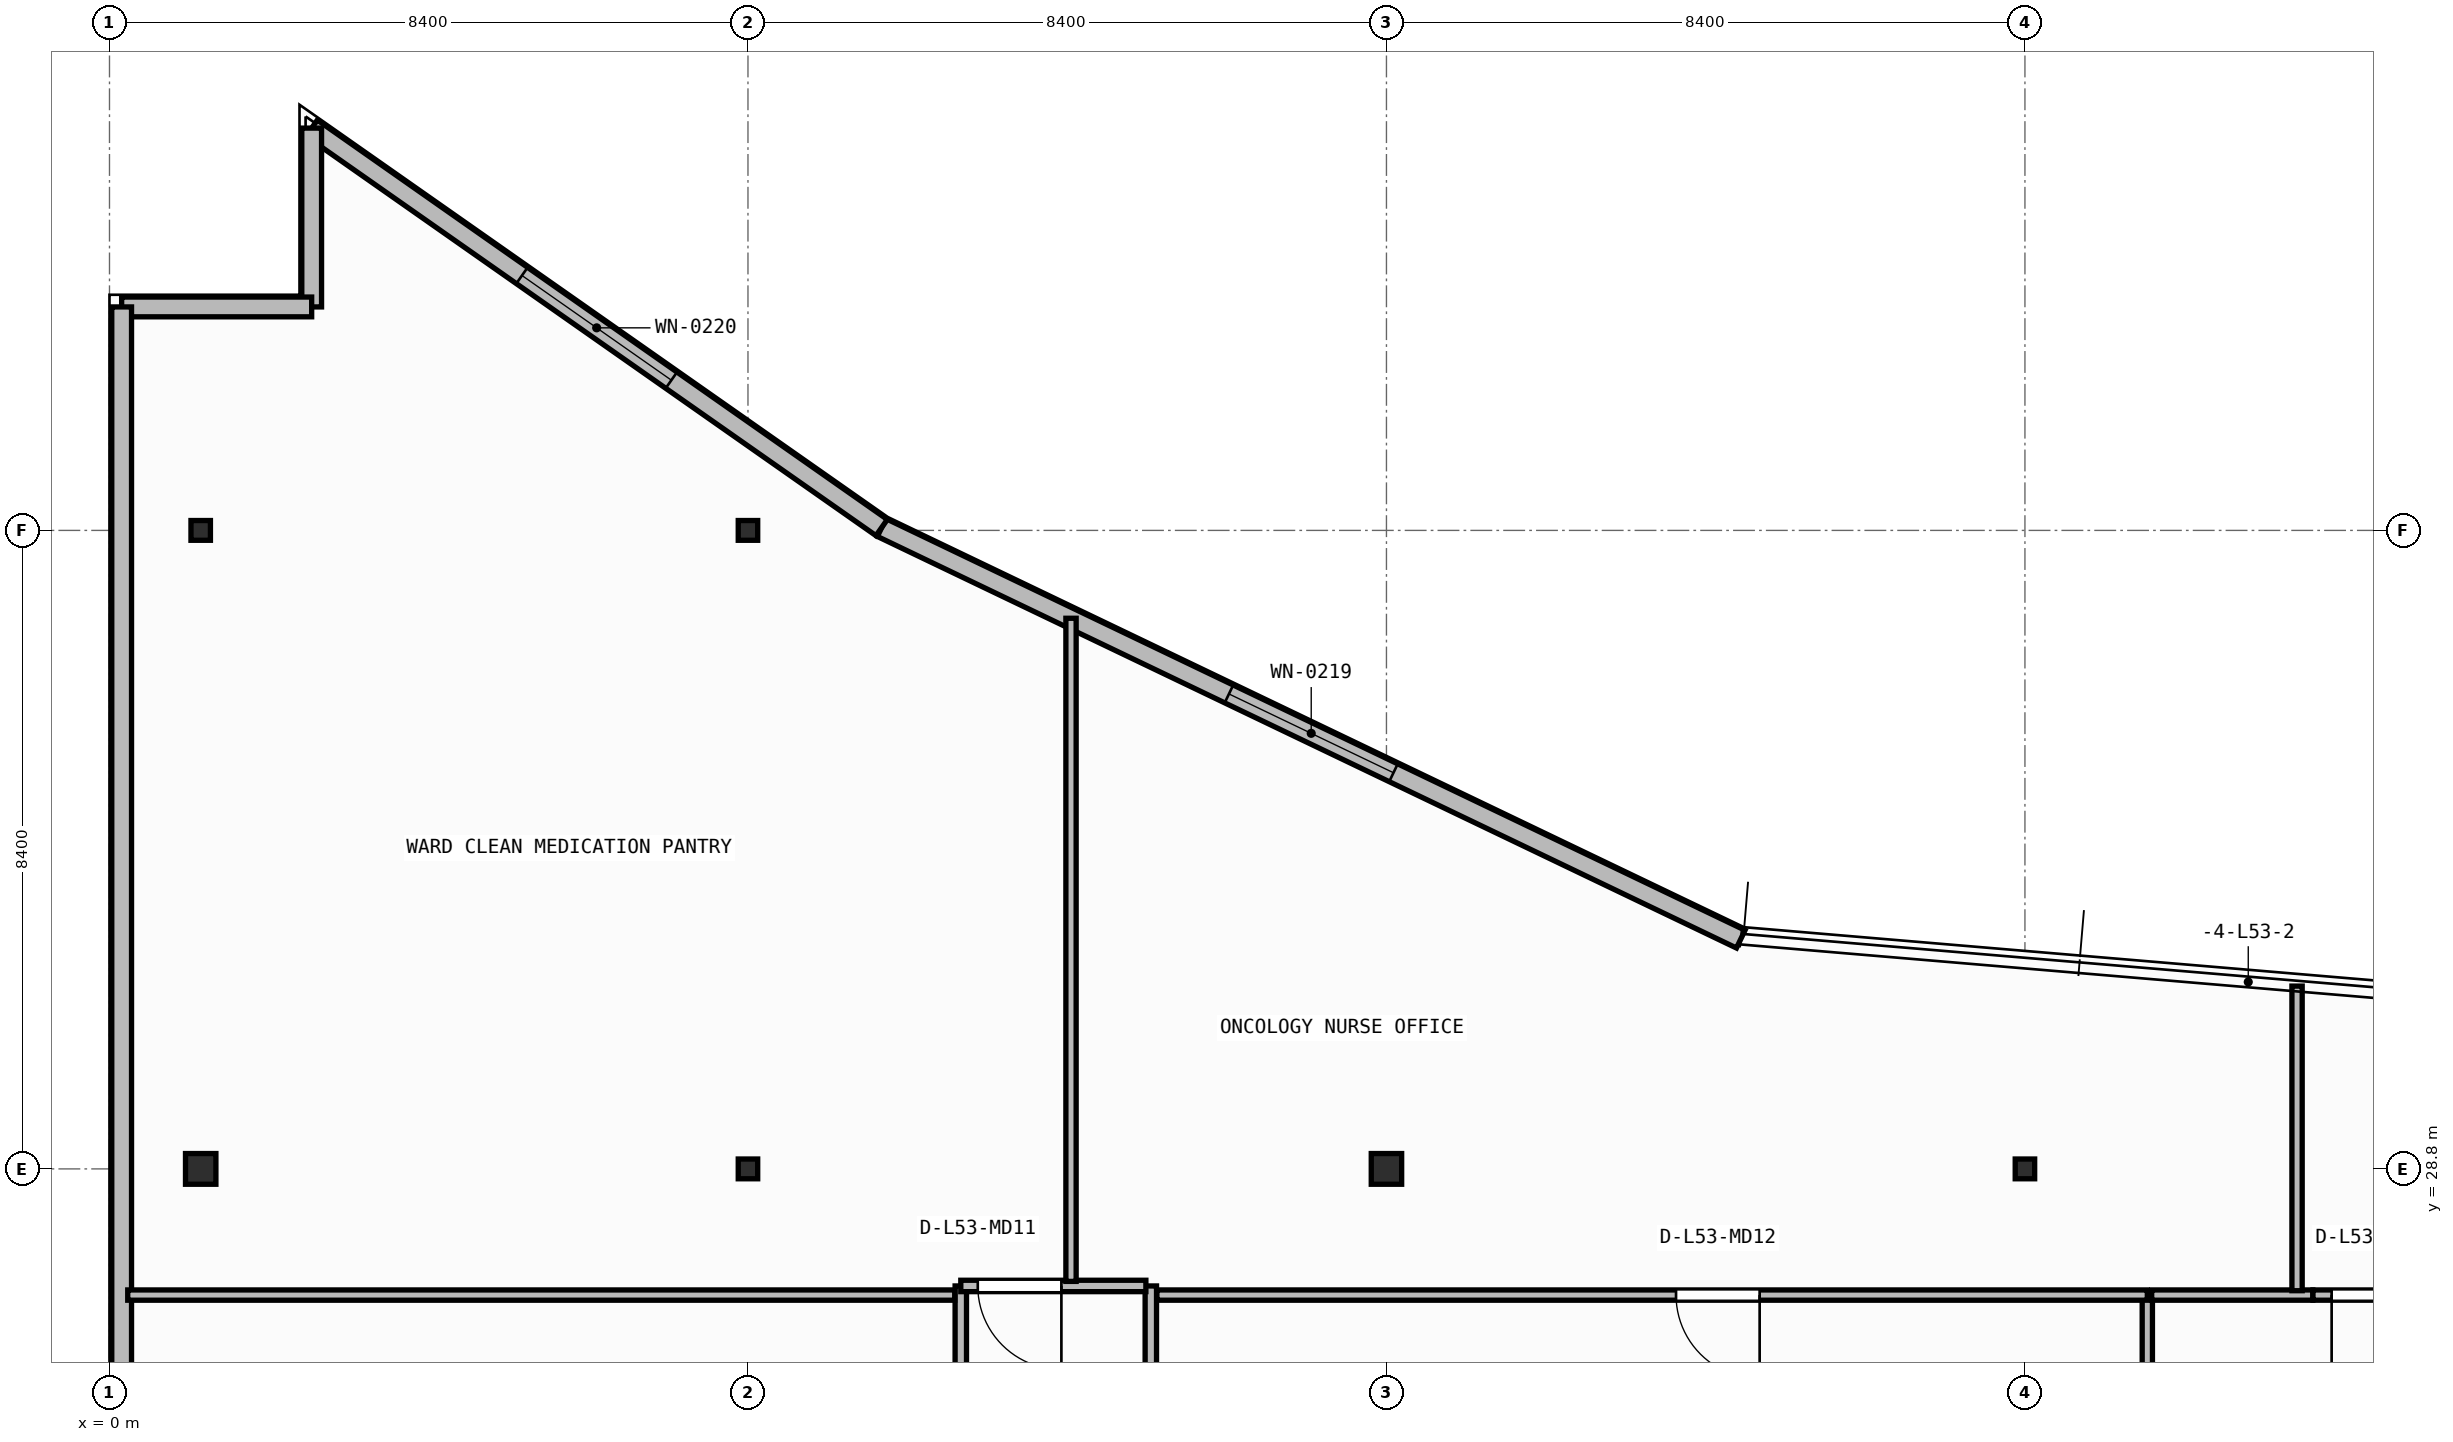
"""IFC4 building model, lengths in metres.
Left out: names, types, materials, properties, quantities, classifications, styles, units other than length and angle.
Written with IfcOpenShell. Run it as: python <this file> out.ifc"""

import sys

from ifc_helpers import new_model, si_unit, direction, frame, frame_2d, origin, origin_2d, place, context, subcontext, project, spatial, rectangle, i_section, extrude, element, fill, save


model = new_model("IFC4")
c1 = context("Model", 3, precision=1e-05, world=origin(), true_north=direction((0.0, 1.0)))
c2 = subcontext(c1, "Body", "Model", "MODEL_VIEW")
j1 = project(units=[si_unit("LENGTHUNIT", "METRE"), si_unit("PLANEANGLEUNIT", "RADIAN")], contexts=[c1])
p1 = place(None, origin())
s1 = spatial("IfcSite", under=j1, at=p1, CompositionType="ELEMENT")
p2 = place(p1, origin())
s2 = spatial("IfcBuilding", under=s1, at=p2, CompositionType="ELEMENT")
p3 = place(p2, frame((0.0, 0.0, 215.8)))
s3 = spatial("IfcBuildingStorey", under=s2, at=p3, CompositionType="ELEMENT", Elevation=215.8)
p4 = place(p3, frame((1.2, 28.8, 0.0), z_axis=(0.0, 0.0, 1.0), x_axis=(1.0, 0.0, 0.0)))
e1 = element("IfcColumn", 1, at=p4, inside=s3, PredefinedType="COLUMN", context=c2, shape_type="SweptSolid", body=[
    extrude(i_section(OverallWidth=0.4, OverallDepth=0.404, WebThickness=0.02, FlangeThickness=0.032, at=origin_2d()), origin(), (0.0, 0.0, 1.0), 3.95),
])
p5 = place(p3, frame((8.4, 28.8, 0.0), z_axis=(0.0, 0.0, 1.0), x_axis=(1.0, 0.0, 0.0)))
e2 = element("IfcColumn", 2, at=p5, inside=s3, PredefinedType="COLUMN", context=c2, shape_type="SweptSolid", body=[
    extrude(i_section(OverallWidth=0.256, OverallDepth=0.26, WebThickness=0.01, FlangeThickness=0.017, FilletRadius=0.013, at=origin_2d()), origin(), (0.0, 0.0, 1.0), 3.95),
])
p6 = place(p3, frame((16.8, 28.8, 0.0), z_axis=(0.0, 0.0, 1.0), x_axis=(1.0, 0.0, 0.0)))
e3 = element("IfcColumn", 3, at=p6, inside=s3, PredefinedType="COLUMN", context=c2, shape_type="SweptSolid", body=[
    extrude(i_section(OverallWidth=0.4, OverallDepth=0.404, WebThickness=0.02, FlangeThickness=0.032, at=origin_2d()), origin(), (0.0, 0.0, 1.0), 3.95),
])
for number, where, z_axis, x_axis in (
    (4, (25.2, 28.8, 0.0), (0.0, 0.0, 1.0), (1.0, 0.0, 0.0)),
    (5, (1.2, 37.2, 0.0), (0.0, 0.0, 1.0), (1.0, 0.0, 0.0)),
    (6, (8.4, 37.2, 0.0), (0.0, 0.0, 1.0), (1.0, 0.0, 0.0)),
):
    element("IfcColumn", number, at=place(p3, frame(where, z_axis=z_axis, x_axis=x_axis)), inside=s3, PredefinedType="COLUMN", context=c2, shape_type="SweptSolid", body=[
        extrude(i_section(OverallWidth=0.256, OverallDepth=0.26, WebThickness=0.01, FlangeThickness=0.017, FilletRadius=0.013, at=origin_2d()), origin(), (0.0, 0.0, 1.0), 3.95),
    ])
p7 = place(p3, frame((21.461, 31.823, 0.0), z_axis=(0.0, 0.0, 1.0), x_axis=(-0.901858094827, 0.432032379336, 0.0)))
e7 = element("IfcWall", 7, at=p7, inside=s3, PredefinedType="STANDARD", context=c2, shape_type="SweptSolid", body=[
    extrude(rectangle(XDim=12.532, YDim=0.26, at=frame_2d((6.266, 0.0))), origin(), (0.0, 0.0, 1.0), 3.71),
])
p8 = place(p7, frame((5.066, 0.0, 0.9)))
e8 = element("IfcOpeningElement", 8, at=p8, cuts=e7, PredefinedType="OPENING", context=c2, shape_type="SweptSolid", body=[
    extrude(rectangle(XDim=2.4, YDim=1.65, at=frame_2d((1.2, 0.825))), frame((0.0, 0.14, 0.0), z_axis=(0.0, -1.0, 0.0), x_axis=(1.0, 0.0, 0.0)), (0.0, 0.0, 1.0), 0.28),
])
p9 = place(p3, frame((10.159, 37.237, 0.0), z_axis=(0.0, 0.0, 1.0), x_axis=(-0.818933702389, 0.57388813465, 0.0)))
e9 = element("IfcWall", 9, at=p9, inside=s3, PredefinedType="STANDARD", context=c2, shape_type="SweptSolid", body=[
    extrude(rectangle(XDim=9.157, YDim=0.26, at=frame_2d((4.579, 0.0))), origin(), (0.0, 0.0, 1.0), 3.71),
])
p10 = place(p9, frame((3.378, 0.0, 0.9)))
e10 = element("IfcOpeningElement", 10, at=p10, cuts=e9, PredefinedType="OPENING", context=c2, shape_type="SweptSolid", body=[
    extrude(rectangle(XDim=2.4, YDim=1.65, at=frame_2d((1.2, 0.825))), frame((0.0, 0.14, 0.0), z_axis=(0.0, -1.0, 0.0), x_axis=(1.0, 0.0, 0.0)), (0.0, 0.0, 1.0), 0.28),
])
p11 = place(p3, frame((2.66, 42.492, 0.0), z_axis=(0.0, 0.0, 1.0), x_axis=(0.0, -1.0, 0.0)))
e11 = element("IfcWall", 11, at=p11, inside=s3, PredefinedType="STANDARD", context=c2, shape_type="SweptSolid", body=[
    extrude(rectangle(XDim=2.353, YDim=0.26, at=frame_2d((1.176, 0.0))), origin(), (0.0, 0.0, 1.0), 3.71),
])
p12 = place(p3, frame((2.66, 40.14, 0.0), z_axis=(0.0, 0.0, 1.0), x_axis=(-1.0, 0.0, 0.0)))
e12 = element("IfcWall", 12, at=p12, inside=s3, PredefinedType="STANDARD", context=c2, shape_type="SweptSolid", body=[
    extrude(rectangle(XDim=2.5, YDim=0.26, at=frame_2d((1.25, 0.0))), origin(), (0.0, 0.0, 1.0), 3.71),
])
p13 = place(p3, frame((0.16, 40.14, 0.0), z_axis=(0.0, 0.0, 1.0), x_axis=(0.0, -1.0, 0.0)))
e13 = element("IfcWall", 13, at=p13, inside=s3, PredefinedType="STANDARD", context=c2, shape_type="SweptSolid", body=[
    extrude(rectangle(XDim=37.48, YDim=0.26, at=frame_2d((18.74, 0.0))), origin(), (0.0, 0.0, 1.0), 3.71),
])
p14 = place(p13, frame((27.4, 0.0, 0.9)))
e14 = element("IfcOpeningElement", 14, at=p14, cuts=e13, PredefinedType="OPENING", context=c2, shape_type="SweptSolid", body=[
    extrude(rectangle(XDim=2.4, YDim=1.65, at=frame_2d((1.2, 0.825))), frame((0.0, 0.14, 0.0), z_axis=(0.0, -1.0, 0.0), x_axis=(1.0, 0.0, 0.0)), (0.0, 0.0, 1.0), 0.28),
])
p15 = place(p3, frame((11.2, 27.26, 0.0), z_axis=(0.0, 0.0, 1.0), x_axis=(0.0, -1.0, 0.0)))
e15 = element("IfcWall", 15, at=p15, inside=s3, PredefinedType="PARTITIONING", context=c2, shape_type="SweptSolid", body=[
    extrude(rectangle(XDim=6.592, YDim=0.15, at=frame_2d((3.296, 0.0))), origin(), (0.0, 0.0, 1.0), 3.71),
])
p16 = place(p15, frame((2.746, 0.0, 0.0)))
e16 = element("IfcOpeningElement", 16, at=p16, cuts=e15, PredefinedType="OPENING", context=c2, shape_type="SweptSolid", body=[
    extrude(rectangle(XDim=1.1, YDim=2.1, at=frame_2d((0.55, 1.05))), frame((0.0, 0.085, 0.0), z_axis=(0.0, -1.0, 0.0), x_axis=(1.0, 0.0, 0.0)), (0.0, 0.0, 1.0), 0.17),
])
p17 = place(p3, frame((13.7, 20.668, 0.0), z_axis=(0.0, 0.0, 1.0), x_axis=(0.0, 1.0, 0.0)))
e17 = element("IfcWall", 17, at=p17, inside=s3, PredefinedType="PARTITIONING", context=c2, shape_type="SweptSolid", body=[
    extrude(rectangle(XDim=6.592, YDim=0.15, at=frame_2d((3.296, 0.0))), origin(), (0.0, 0.0, 1.0), 3.71),
])
p18 = place(p17, frame((2.746, 0.0, 0.0)))
e18 = element("IfcOpeningElement", 18, at=p18, cuts=e17, PredefinedType="OPENING", context=c2, shape_type="SweptSolid", body=[
    extrude(rectangle(XDim=1.1, YDim=2.1, at=frame_2d((0.55, 1.05))), frame((0.0, 0.085, 0.0), z_axis=(0.0, -1.0, 0.0), x_axis=(1.0, 0.0, 0.0)), (0.0, 0.0, 1.0), 0.17),
])
p19 = place(p3, frame((13.635, 27.26, 0.0), z_axis=(0.0, 0.0, 1.0), x_axis=(-1.0, 0.0, 0.0)))
e19 = element("IfcWall", 19, at=p19, inside=s3, PredefinedType="PARTITIONING", context=c2, shape_type="SweptSolid", body=[
    extrude(rectangle(XDim=2.435, YDim=0.15, at=frame_2d((1.218, 0.0))), origin(), (0.0, 0.0, 1.0), 3.71),
])
p20 = place(p19, frame((1.112, 0.0, 0.0)))
e20 = element("IfcOpeningElement", 20, at=p20, cuts=e19, PredefinedType="OPENING", context=c2, shape_type="SweptSolid", body=[
    extrude(rectangle(XDim=1.1, YDim=2.1, at=frame_2d((0.55, 1.05))), frame((0.0, 0.085, 0.0), z_axis=(0.0, -1.0, 0.0), x_axis=(1.0, 0.0, 0.0)), (0.0, 0.0, 1.0), 0.17),
])
p21 = place(p3, frame((11.12, 27.14, 0.0), z_axis=(0.0, 0.0, 1.0), x_axis=(-1.0, 0.0, 0.0)))
e21 = element("IfcWall", 21, at=p21, inside=s3, PredefinedType="PARTITIONING", context=c2, shape_type="SweptSolid", body=[
    extrude(rectangle(XDim=10.88, YDim=0.135, at=frame_2d((5.44, 0.0))), origin(), (0.0, 0.0, 1.0), 3.71),
])
p22 = place(p3, frame((26.81, 20.498, 0.0), z_axis=(0.0, 0.0, 1.0), x_axis=(0.0, 1.0, 0.0)))
e22 = element("IfcWall", 22, at=p22, inside=s3, PredefinedType="PARTITIONING", context=c2, shape_type="SweptSolid", body=[
    extrude(rectangle(XDim=6.642, YDim=0.135, at=frame_2d((3.321, 0.0))), origin(), (0.0, 0.0, 1.0), 3.71),
])
p23 = place(p3, frame((26.81, 27.14, 0.0), z_axis=(0.0, 0.0, 1.0), x_axis=(-1.0, 0.0, 0.0)))
e23 = element("IfcWall", 23, at=p23, inside=s3, PredefinedType="PARTITIONING", context=c2, shape_type="SweptSolid", body=[
    extrude(rectangle(XDim=13.03, YDim=0.135, at=frame_2d((6.515, 0.0))), origin(), (0.0, 0.0, 1.0), 3.71),
])
p24 = place(p23, frame((5.1, 0.0, 0.0)))
e24 = element("IfcOpeningElement", 24, at=p24, cuts=e23, PredefinedType="OPENING", context=c2, shape_type="SweptSolid", body=[
    extrude(rectangle(XDim=1.1, YDim=2.1, at=frame_2d((0.55, 1.05))), frame((0.0, 0.077, 0.0), z_axis=(0.0, -1.0, 0.0), x_axis=(1.0, 0.0, 0.0)), (0.0, 0.0, 1.0), 0.155),
])
p25 = place(p3, frame((28.988, 27.14, 0.0), z_axis=(0.0, 0.0, 1.0), x_axis=(-1.0, 0.0, 0.0)))
e25 = element("IfcWall", 25, at=p25, inside=s3, PredefinedType="PARTITIONING", context=c2, shape_type="SweptSolid", body=[
    extrude(rectangle(XDim=2.12, YDim=0.135, at=frame_2d((1.06, 0.0))), origin(), (0.0, 0.0, 1.0), 3.71),
])
p26 = place(p3, frame((32.31, 27.14, 0.0), z_axis=(0.0, 0.0, 1.0), x_axis=(-1.0, 0.0, 0.0)))
e26 = element("IfcWall", 26, at=p26, inside=s3, PredefinedType="PARTITIONING", context=c2, shape_type="SweptSolid", body=[
    extrude(rectangle(XDim=3.321, YDim=0.135, at=frame_2d((1.66, 0.0))), origin(), (0.0, 0.0, 1.0), 3.71),
])
p27 = place(p26, frame((1.975, 0.0, 0.0)))
e27 = element("IfcOpeningElement", 27, at=p27, cuts=e26, PredefinedType="OPENING", context=c2, shape_type="SweptSolid", body=[
    extrude(rectangle(XDim=1.1, YDim=2.1, at=frame_2d((0.55, 1.05))), frame((0.0, 0.077, 0.0), z_axis=(0.0, -1.0, 0.0), x_axis=(1.0, 0.0, 0.0)), (0.0, 0.0, 1.0), 0.155),
])
p28 = place(p3, frame((12.65, 27.32, 0.0), z_axis=(0.0, 0.0, 1.0), x_axis=(0.0, 1.0, 0.0)))
e28 = element("IfcWall", 28, at=p28, inside=s3, PredefinedType="PARTITIONING", context=c2, shape_type="SweptSolid", body=[
    extrude(rectangle(XDim=8.724, YDim=0.135, at=frame_2d((4.362, 0.0))), origin(), (0.0, 0.0, 1.0), 3.71),
])
p29 = place(p3, frame((28.78, 27.198, 0.0), z_axis=(0.0, 0.0, 1.0), x_axis=(0.0, 1.0, 0.0)))
e29 = element("IfcWall", 29, at=p29, inside=s3, PredefinedType="PARTITIONING", context=c2, shape_type="SweptSolid", body=[
    extrude(rectangle(XDim=4.008, YDim=0.135, at=frame_2d((2.004, 0.0))), origin(), (0.0, 0.0, 1.0), 3.71),
])
p30 = place(p8, origin())
e30 = element("IfcWindow", 30, at=p30, inside=s3, PartitioningType="SINGLE_PANEL", PredefinedType="WINDOW", context=c2, shape_type="SweptSolid", body=[
    extrude(rectangle(XDim=2.4, YDim=1.65, at=frame_2d((1.2, 0.825))), frame((0.0, 0.03, 0.0), z_axis=(0.0, -1.0, 0.0), x_axis=(1.0, 0.0, 0.0)), (0.0, 0.0, 1.0), 0.06),
])
fill(e8, e30)
p31 = place(p10, origin())
e31 = element("IfcWindow", 31, at=p31, inside=s3, PartitioningType="SINGLE_PANEL", PredefinedType="WINDOW", context=c2, shape_type="SweptSolid", body=[
    extrude(rectangle(XDim=2.4, YDim=1.65, at=frame_2d((1.2, 0.825))), frame((0.0, 0.03, 0.0), z_axis=(0.0, -1.0, 0.0), x_axis=(1.0, 0.0, 0.0)), (0.0, 0.0, 1.0), 0.06),
])
fill(e10, e31)
p32 = place(p20, origin())
e32 = element("IfcDoor", 32, at=p32, inside=s3, OperationType="SINGLE_SWING_LEFT", PredefinedType="DOOR", context=c2, shape_type="SweptSolid", body=[
    extrude(rectangle(XDim=1.1, YDim=2.1, at=frame_2d((0.55, 1.05))), frame((0.0, 0.025, 0.0), z_axis=(0.0, -1.0, 0.0), x_axis=(1.0, 0.0, 0.0)), (0.0, 0.0, 1.0), 0.05),
])
fill(e20, e32)
p33 = place(p24, origin())
e33 = element("IfcDoor", 33, at=p33, inside=s3, OperationType="SINGLE_SWING_LEFT", PredefinedType="DOOR", context=c2, shape_type="SweptSolid", body=[
    extrude(rectangle(XDim=1.1, YDim=2.1, at=frame_2d((0.55, 1.05))), frame((0.0, 0.025, 0.0), z_axis=(0.0, -1.0, 0.0), x_axis=(1.0, 0.0, 0.0)), (0.0, 0.0, 1.0), 0.05),
])
fill(e24, e33)
p34 = place(p27, origin())
e34 = element("IfcDoor", 34, at=p34, inside=s3, OperationType="SINGLE_SWING_RIGHT", PredefinedType="DOOR", context=c2, shape_type="SweptSolid", body=[
    extrude(rectangle(XDim=1.1, YDim=2.1, at=frame_2d((0.55, 1.05))), frame((0.0, 0.025, 0.0), z_axis=(0.0, -1.0, 0.0), x_axis=(1.0, 0.0, 0.0)), (0.0, 0.0, 1.0), 0.05),
])
fill(e27, e34)
save(model, sys.argv[1])
